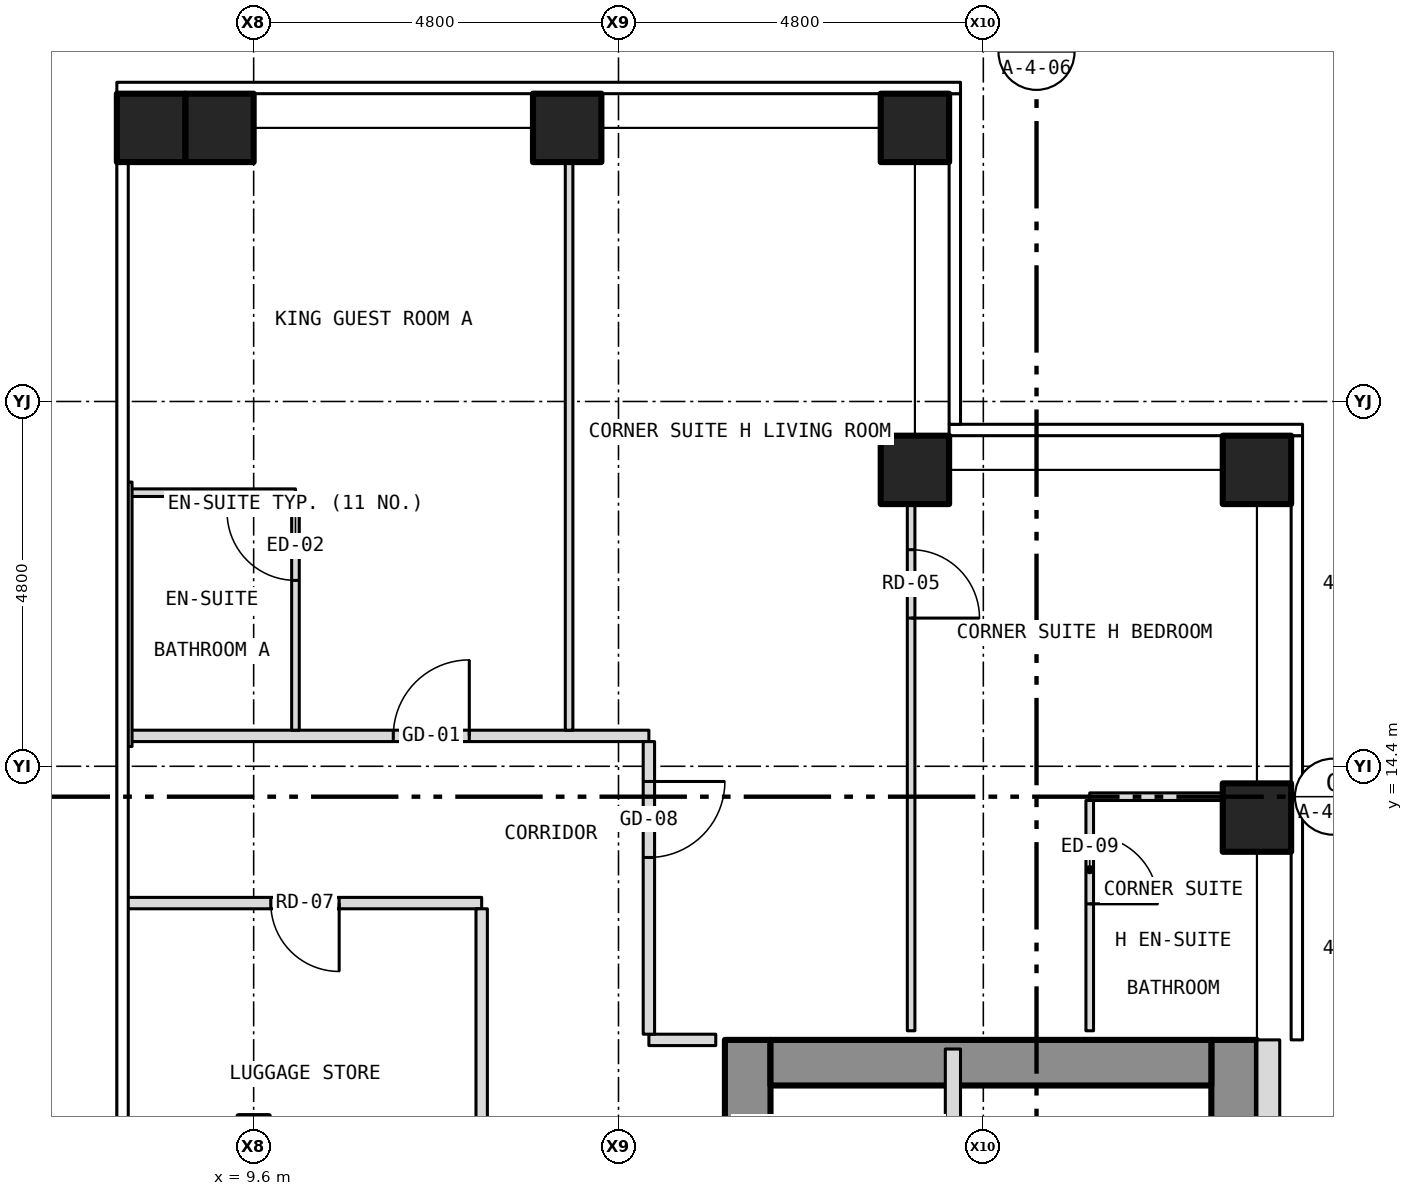
"""IFC4 building model, lengths in metres.
Left out: names, types, materials, properties, quantities, classifications, styles, units other than length and angle.
Written with IfcOpenShell. Run it as: python <this file> out.ifc"""

import sys

from ifc_helpers import new_model, si_unit, direction, frame, frame_2d, origin, origin_2d, place, context, subcontext, project, spatial, rectangle, hollow_rectangle, extrude, element, fill, save


model = new_model("IFC4")
c1 = context("Model", 3, precision=1e-05, world=origin(), true_north=direction((0.0, 1.0)))
c2 = subcontext(c1, "Body", "Model", "MODEL_VIEW")
j1 = project(units=[si_unit("LENGTHUNIT", "METRE"), si_unit("PLANEANGLEUNIT", "RADIAN")], contexts=[c1])
p1 = place(None, origin())
s1 = spatial("IfcSite", under=j1, at=p1, CompositionType="ELEMENT")
p2 = place(p1, origin())
s2 = spatial("IfcBuilding", under=s1, at=p2, CompositionType="ELEMENT")
p3 = place(p2, frame((0.0, 0.0, 127.5)))
s3 = spatial("IfcBuildingStorey", under=s2, at=p3, CompositionType="ELEMENT", Elevation=127.5)
for number, where, z_axis, x_axis in (
    (1, (9.15, 22.8, -0.15), (0.0, 0.0, 1.0), (1.0, 0.0, 0.0)),
    (2, (13.725, 22.8, -0.15), (0.0, 0.0, 1.0), (1.0, 0.0, 0.0)),
    (3, (18.3, 22.8, -0.15), (0.0, 0.0, 1.0), (1.0, 0.0, 0.0)),
    (4, (22.8, 13.725, -0.15), (0.0, 0.0, 1.0), (1.0, 0.0, 0.0)),
    (5, (22.8, 18.3, -0.15), (0.0, 0.0, 1.0), (1.0, 0.0, 0.0)),
    (6, (18.3, 18.3, -0.15), (0.0, 0.0, 1.0), (1.0, 0.0, 0.0)),
    (7, (8.25, 22.8, -0.15), (0.0, 0.0, 1.0), (1.0, 0.0, 0.0)),
):
    element("IfcColumn", number, at=place(p3, frame(where, z_axis=z_axis, x_axis=x_axis)), inside=s3, PredefinedType="COLUMN", context=c2, shape_type="SweptSolid", body=[
        extrude(hollow_rectangle(XDim=0.9, YDim=0.9, WallThickness=0.05, at=origin_2d()), origin(), (0.0, 0.0, 1.0), 3.5),
    ])
p4 = place(p3, frame((16.1, -10.8, 0.0), z_axis=(0.0, 0.0, 1.0), x_axis=(0.0, 1.0, 0.0)))
e8 = element("IfcWall", 8, at=p4, inside=s3, PredefinedType="SHEAR", context=c2, shape_type="SweptSolid", body=[
    extrude(rectangle(XDim=21.6, YDim=0.6, at=frame_2d((10.8, 0.0))), origin(), (0.0, 0.0, 1.0), 3.25),
])
p5 = place(p4, frame((9.4, 0.0, 0.0)))
e9 = element("IfcOpeningElement", 9, at=p5, cuts=e8, PredefinedType="OPENING", context=c2, shape_type="SweptSolid", body=[
    extrude(rectangle(XDim=1.1, YDim=2.1, at=frame_2d((0.55, 1.05))), frame((0.0, 0.312, 0.0), z_axis=(0.0, -1.0, 0.0), x_axis=(1.0, 0.0, 0.0)), (0.0, 0.0, 1.0), 0.624),
])
p6 = place(p4, frame((11.5, 0.0, 0.0)))
e10 = element("IfcOpeningElement", 10, at=p6, cuts=e8, PredefinedType="OPENING", context=c2, shape_type="SweptSolid", body=[
    extrude(rectangle(XDim=1.1, YDim=2.1, at=frame_2d((0.55, 1.05))), frame((0.0, 0.312, 0.0), z_axis=(0.0, -1.0, 0.0), x_axis=(1.0, 0.0, 0.0)), (0.0, 0.0, 1.0), 0.624),
])
p7 = place(p4, frame((13.6, 0.0, 0.0)))
e11 = element("IfcOpeningElement", 11, at=p7, cuts=e8, PredefinedType="OPENING", context=c2, shape_type="SweptSolid", body=[
    extrude(rectangle(XDim=1.1, YDim=2.1, at=frame_2d((0.55, 1.05))), frame((0.0, 0.312, 0.0), z_axis=(0.0, -1.0, 0.0), x_axis=(1.0, 0.0, 0.0)), (0.0, 0.0, 1.0), 0.624),
])
p8 = place(p4, frame((15.7, 0.0, 0.0)))
e12 = element("IfcOpeningElement", 12, at=p8, cuts=e8, PredefinedType="OPENING", context=c2, shape_type="SweptSolid", body=[
    extrude(rectangle(XDim=1.1, YDim=2.1, at=frame_2d((0.55, 1.05))), frame((0.0, 0.312, 0.0), z_axis=(0.0, -1.0, 0.0), x_axis=(1.0, 0.0, 0.0)), (0.0, 0.0, 1.0), 0.624),
])
p9 = place(p4, frame((17.8, 0.0, 0.0)))
e13 = element("IfcOpeningElement", 13, at=p9, cuts=e8, PredefinedType="OPENING", context=c2, shape_type="SweptSolid", body=[
    extrude(rectangle(XDim=1.1, YDim=2.1, at=frame_2d((0.55, 1.05))), frame((0.0, 0.312, 0.0), z_axis=(0.0, -1.0, 0.0), x_axis=(1.0, 0.0, 0.0)), (0.0, 0.0, 1.0), 0.624),
])
p10 = place(p4, frame((5.642, 0.0, 0.0)))
e14 = element("IfcOpeningElement", 14, at=p10, cuts=e8, PredefinedType="OPENING", context=c2, shape_type="SweptSolid", body=[
    extrude(rectangle(XDim=1.1, YDim=2.1, at=frame_2d((0.55, 1.05))), frame((0.0, 0.312, 0.0), z_axis=(0.0, -1.0, 0.0), x_axis=(1.0, 0.0, 0.0)), (0.0, 0.0, 1.0), 0.624),
])
p11 = place(p4, frame((7.5, 0.0, 0.0)))
e15 = element("IfcOpeningElement", 15, at=p11, cuts=e8, PredefinedType="OPENING", context=c2, shape_type="SweptSolid", body=[
    extrude(rectangle(XDim=1.1, YDim=2.1, at=frame_2d((0.55, 1.05))), frame((0.0, 0.312, 0.0), z_axis=(0.0, -1.0, 0.0), x_axis=(1.0, 0.0, 0.0)), (0.0, 0.0, 1.0), 0.624),
])
p12 = place(p3, frame((22.5, -10.8, 0.0), z_axis=(0.0, 0.0, 1.0), x_axis=(0.0, 1.0, 0.0)))
e16 = element("IfcWall", 16, at=p12, inside=s3, PredefinedType="SHEAR", context=c2, shape_type="SweptSolid", body=[
    extrude(rectangle(XDim=21.6, YDim=0.6, at=frame_2d((10.8, 0.0))), origin(), (0.0, 0.0, 1.0), 3.25),
])
p13 = place(p3, frame((16.4, 10.5, 0.0), z_axis=(0.0, 0.0, 1.0), x_axis=(1.0, 0.0, 0.0)))
e17 = element("IfcWall", 17, at=p13, inside=s3, PredefinedType="SHEAR", context=c2, shape_type="SweptSolid", body=[
    extrude(rectangle(XDim=5.8, YDim=0.6, at=frame_2d((2.9, 0.0))), origin(), (0.0, 0.0, 1.0), 3.25),
])
p14 = place(p3, frame((22.95, -10.8, 0.0), z_axis=(0.0, 0.0, 1.0), x_axis=(0.0, 1.0, 0.0)))
e18 = element("IfcWall", 18, at=p14, inside=s3, PredefinedType="SOLIDWALL", context=c2, shape_type="SweptSolid", body=[
    extrude(rectangle(XDim=21.6, YDim=0.3, at=frame_2d((10.8, 0.0))), origin(), (0.0, 0.0, 1.0), 3.5),
])
p15 = place(p14, frame((2.95, 0.0, 1.0)))
e19 = element("IfcOpeningElement", 19, at=p15, cuts=e18, PredefinedType="OPENING", context=c2, shape_type="SweptSolid", body=[
    extrude(rectangle(XDim=0.6, YDim=1.5, at=frame_2d((0.3, 0.75))), frame((0.0, 0.162, 0.0), z_axis=(0.0, -1.0, 0.0), x_axis=(1.0, 0.0, 0.0)), (0.0, 0.0, 1.0), 0.324),
])
p16 = place(p3, frame((14.8, 10.8, 0.0), z_axis=(0.0, 0.0, 1.0), x_axis=(1.0, 0.0, 0.0)))
e20 = element("IfcWall", 20, at=p16, inside=s3, PredefinedType="PARTITIONING", context=c2, shape_type="SweptSolid", body=[
    extrude(rectangle(XDim=0.88, YDim=0.15, at=frame_2d((0.44, 0.0))), origin(), (0.0, 0.0, 1.0), 3.35),
])
p17 = place(p3, frame((7.92, 12.6, 0.0), z_axis=(0.0, 0.0, 1.0), x_axis=(1.0, 0.0, 0.0)))
e21 = element("IfcWall", 21, at=p17, inside=s3, PredefinedType="PARTITIONING", context=c2, shape_type="SweptSolid", body=[
    extrude(rectangle(XDim=4.68, YDim=0.15, at=frame_2d((2.34, 0.0))), origin(), (0.0, 0.0, 1.0), 3.35),
])
p18 = place(p17, frame((1.905, 0.0, 0.0)))
e22 = element("IfcOpeningElement", 22, at=p18, cuts=e21, PredefinedType="OPENING", context=c2, shape_type="SweptSolid", body=[
    extrude(rectangle(XDim=0.9, YDim=2.1, at=frame_2d((0.45, 1.05))), frame((0.0, 0.087, 0.0), z_axis=(0.0, -1.0, 0.0), x_axis=(1.0, 0.0, 0.0)), (0.0, 0.0, 1.0), 0.174),
])
p19 = place(p3, frame((20.6, 14.0, 0.0), z_axis=(0.0, 0.0, 1.0), x_axis=(1.0, 0.0, 0.0)))
e23 = element("IfcWall", 23, at=p19, inside=s3, PredefinedType="PARTITIONING", context=c2, shape_type="SweptSolid", body=[
    extrude(rectangle(XDim=2.08, YDim=0.1, at=frame_2d((1.04, 0.0))), origin(), (0.0, 0.0, 1.0), 3.35),
])
p20 = place(p3, frame((7.95, 14.8, 0.0), z_axis=(0.0, 0.0, 1.0), x_axis=(1.0, 0.0, 0.0)))
e24 = element("IfcWall", 24, at=p20, inside=s3, PredefinedType="PARTITIONING", context=c2, shape_type="SweptSolid", body=[
    extrude(rectangle(XDim=6.85, YDim=0.15, at=frame_2d((3.425, 0.0))), origin(), (0.0, 0.0, 1.0), 3.35),
])
p21 = place(p20, frame((3.487, 0.0, 0.0)))
e25 = element("IfcOpeningElement", 25, at=p21, cuts=e24, PredefinedType="OPENING", context=c2, shape_type="SweptSolid", body=[
    extrude(rectangle(XDim=1.0, YDim=2.1, at=frame_2d((0.5, 1.05))), frame((0.0, 0.087, 0.0), z_axis=(0.0, -1.0, 0.0), x_axis=(1.0, 0.0, 0.0)), (0.0, 0.0, 1.0), 0.174),
])
p22 = place(p3, frame((7.95, 18.0, 0.0), z_axis=(0.0, 0.0, 1.0), x_axis=(1.0, 0.0, 0.0)))
e26 = element("IfcWall", 26, at=p22, inside=s3, PredefinedType="PARTITIONING", context=c2, shape_type="SweptSolid", body=[
    extrude(rectangle(XDim=2.2, YDim=0.1, at=frame_2d((1.1, 0.0))), origin(), (0.0, 0.0, 1.0), 3.35),
])
p23 = place(p3, frame((7.95, 14.66, 0.0), z_axis=(0.0, 0.0, 1.0), x_axis=(0.0, 1.0, 0.0)))
e27 = element("IfcWall", 27, at=p23, inside=s3, PredefinedType="PARTITIONING", context=c2, shape_type="SweptSolid", body=[
    extrude(rectangle(XDim=3.48, YDim=0.1, at=frame_2d((1.74, 0.0))), origin(), (0.0, 0.0, 1.0), 2.733),
])
p24 = place(p3, frame((10.15, 14.875, 0.0), z_axis=(0.0, 0.0, 1.0), x_axis=(0.0, 1.0, 0.0)))
e28 = element("IfcWall", 28, at=p24, inside=s3, PredefinedType="PARTITIONING", context=c2, shape_type="SweptSolid", body=[
    extrude(rectangle(XDim=3.075, YDim=0.1, at=frame_2d((1.538, 0.0))), origin(), (0.0, 0.0, 1.0), 3.35),
])
p25 = place(p24, frame((1.971, 0.0, 0.0)))
e29 = element("IfcOpeningElement", 29, at=p25, cuts=e28, PredefinedType="OPENING", context=c2, shape_type="SweptSolid", body=[
    extrude(rectangle(XDim=0.9, YDim=2.1, at=frame_2d((0.45, 1.05))), frame((0.0, 0.062, 0.0), z_axis=(0.0, -1.0, 0.0), x_axis=(1.0, 0.0, 0.0)), (0.0, 0.0, 1.0), 0.124),
])
p26 = place(p3, frame((12.6, 8.175, 0.0), z_axis=(0.0, 0.0, 1.0), x_axis=(0.0, 1.0, 0.0)))
e30 = element("IfcWall", 30, at=p26, inside=s3, PredefinedType="PARTITIONING", context=c2, shape_type="SweptSolid", body=[
    extrude(rectangle(XDim=4.35, YDim=0.15, at=frame_2d((2.175, 0.0))), origin(), (0.0, 0.0, 1.0), 3.35),
])
p27 = place(p3, frame((13.75, 14.875, 0.0), z_axis=(0.0, 0.0, 1.0), x_axis=(0.0, 1.0, 0.0)))
e31 = element("IfcWall", 31, at=p27, inside=s3, PredefinedType="PARTITIONING", context=c2, shape_type="SweptSolid", body=[
    extrude(rectangle(XDim=7.805, YDim=0.1, at=frame_2d((3.902, 0.0))), origin(), (0.0, 0.0, 1.0), 3.35),
])
p28 = place(p3, frame((14.8, 10.875, 0.0), z_axis=(0.0, 0.0, 1.0), x_axis=(0.0, 1.0, 0.0)))
e32 = element("IfcWall", 32, at=p28, inside=s3, PredefinedType="PARTITIONING", context=c2, shape_type="SweptSolid", body=[
    extrude(rectangle(XDim=3.85, YDim=0.15, at=frame_2d((1.925, 0.0))), origin(), (0.0, 0.0, 1.0), 3.35),
])
p29 = place(p28, frame((2.325, 0.0, 0.0)))
e33 = element("IfcOpeningElement", 33, at=p29, cuts=e32, PredefinedType="OPENING", context=c2, shape_type="SweptSolid", body=[
    extrude(rectangle(XDim=1.0, YDim=2.1, at=frame_2d((0.5, 1.05))), frame((0.0, 0.087, 0.0), z_axis=(0.0, -1.0, 0.0), x_axis=(1.0, 0.0, 0.0)), (0.0, 0.0, 1.0), 0.174),
])
p30 = place(p3, frame((18.25, 10.92, 0.0), z_axis=(0.0, 0.0, 1.0), x_axis=(0.0, 1.0, 0.0)))
e34 = element("IfcWall", 34, at=p30, inside=s3, PredefinedType="PARTITIONING", context=c2, shape_type="SweptSolid", body=[
    extrude(rectangle(XDim=7.271, YDim=0.1, at=frame_2d((3.635, 0.0))), origin(), (0.0, 0.0, 1.0), 3.35),
])
p31 = place(p30, frame((5.43, 0.0, 0.0)))
e35 = element("IfcOpeningElement", 35, at=p31, cuts=e34, PredefinedType="OPENING", context=c2, shape_type="SweptSolid", body=[
    extrude(rectangle(XDim=0.9, YDim=2.1, at=frame_2d((0.45, 1.05))), frame((0.0, 0.062, 0.0), z_axis=(0.0, -1.0, 0.0), x_axis=(1.0, 0.0, 0.0)), (0.0, 0.0, 1.0), 0.124),
])
p32 = place(p3, frame((18.8, -1.8, 0.0), z_axis=(0.0, 0.0, 1.0), x_axis=(0.0, 1.0, 0.0)))
e36 = element("IfcWall", 36, at=p32, inside=s3, PredefinedType="PARTITIONING", context=c2, shape_type="SweptSolid", body=[
    extrude(rectangle(XDim=12.48, YDim=0.2, at=frame_2d((6.24, 0.0))), origin(), (0.0, 0.0, 1.0), 3.25),
])
p33 = place(p3, frame((20.6, 10.92, 0.0), z_axis=(0.0, 0.0, 1.0), x_axis=(0.0, 1.0, 0.0)))
e37 = element("IfcWall", 37, at=p33, inside=s3, PredefinedType="PARTITIONING", context=c2, shape_type="SweptSolid", body=[
    extrude(rectangle(XDim=3.03, YDim=0.1, at=frame_2d((1.515, 0.0))), origin(), (0.0, 0.0, 1.0), 3.35),
])
p34 = place(p33, frame((1.67, 0.0, 0.0)))
e38 = element("IfcOpeningElement", 38, at=p34, cuts=e37, PredefinedType="OPENING", context=c2, shape_type="SweptSolid", body=[
    extrude(rectangle(XDim=0.9, YDim=2.1, at=frame_2d((0.45, 1.05))), frame((0.0, 0.062, 0.0), z_axis=(0.0, -1.0, 0.0), x_axis=(1.0, 0.0, 0.0)), (0.0, 0.0, 1.0), 0.124),
])
p35 = place(p21, origin())
e39 = element("IfcDoor", 39, at=p35, inside=s3, OperationType="SINGLE_SWING_RIGHT", PredefinedType="DOOR", context=c2, shape_type="SweptSolid", body=[
    extrude(rectangle(XDim=1.0, YDim=2.1, at=frame_2d((0.5, 1.05))), frame((0.0, 0.025, 0.0), z_axis=(0.0, -1.0, 0.0), x_axis=(1.0, 0.0, 0.0)), (0.0, 0.0, 1.0), 0.05),
])
fill(e25, e39)
p36 = place(p25, origin())
e40 = element("IfcDoor", 40, at=p36, inside=s3, OperationType="SINGLE_SWING_RIGHT", PredefinedType="DOOR", context=c2, shape_type="SweptSolid", body=[
    extrude(rectangle(XDim=0.9, YDim=2.1, at=frame_2d((0.45, 1.05))), frame((0.0, 0.025, 0.0), z_axis=(0.0, -1.0, 0.0), x_axis=(1.0, 0.0, 0.0)), (0.0, 0.0, 1.0), 0.05),
])
fill(e29, e40)
p37 = place(p29, origin())
e41 = element("IfcDoor", 41, at=p37, inside=s3, OperationType="SINGLE_SWING_RIGHT", PredefinedType="DOOR", context=c2, shape_type="SweptSolid", body=[
    extrude(rectangle(XDim=1.0, YDim=2.1, at=frame_2d((0.5, 1.05))), frame((0.0, 0.025, 0.0), z_axis=(0.0, -1.0, 0.0), x_axis=(1.0, 0.0, 0.0)), (0.0, 0.0, 1.0), 0.05),
])
fill(e33, e41)
p38 = place(p31, origin())
e42 = element("IfcDoor", 42, at=p38, inside=s3, OperationType="SINGLE_SWING_LEFT", PredefinedType="DOOR", context=c2, shape_type="SweptSolid", body=[
    extrude(rectangle(XDim=0.9, YDim=2.1, at=frame_2d((0.45, 1.05))), frame((0.0, 0.025, 0.0), z_axis=(0.0, -1.0, 0.0), x_axis=(1.0, 0.0, 0.0)), (0.0, 0.0, 1.0), 0.05),
])
fill(e35, e42)
p39 = place(p34, origin())
e43 = element("IfcDoor", 43, at=p39, inside=s3, OperationType="SINGLE_SWING_LEFT", PredefinedType="DOOR", context=c2, shape_type="SweptSolid", body=[
    extrude(rectangle(XDim=0.9, YDim=2.1, at=frame_2d((0.45, 1.05))), frame((0.0, 0.025, 0.0), z_axis=(0.0, -1.0, 0.0), x_axis=(1.0, 0.0, 0.0)), (0.0, 0.0, 1.0), 0.05),
])
fill(e38, e43)
p40 = place(p18, origin())
e44 = element("IfcDoor", 44, at=p40, inside=s3, OperationType="SINGLE_SWING_RIGHT", PredefinedType="DOOR", context=c2, shape_type="SweptSolid", body=[
    extrude(rectangle(XDim=0.9, YDim=2.1, at=frame_2d((0.45, 1.05))), frame((0.0, 0.025, 0.0), z_axis=(0.0, -1.0, 0.0), x_axis=(1.0, 0.0, 0.0)), (0.0, 0.0, 1.0), 0.05),
])
fill(e22, e44)
save(model, sys.argv[1])
